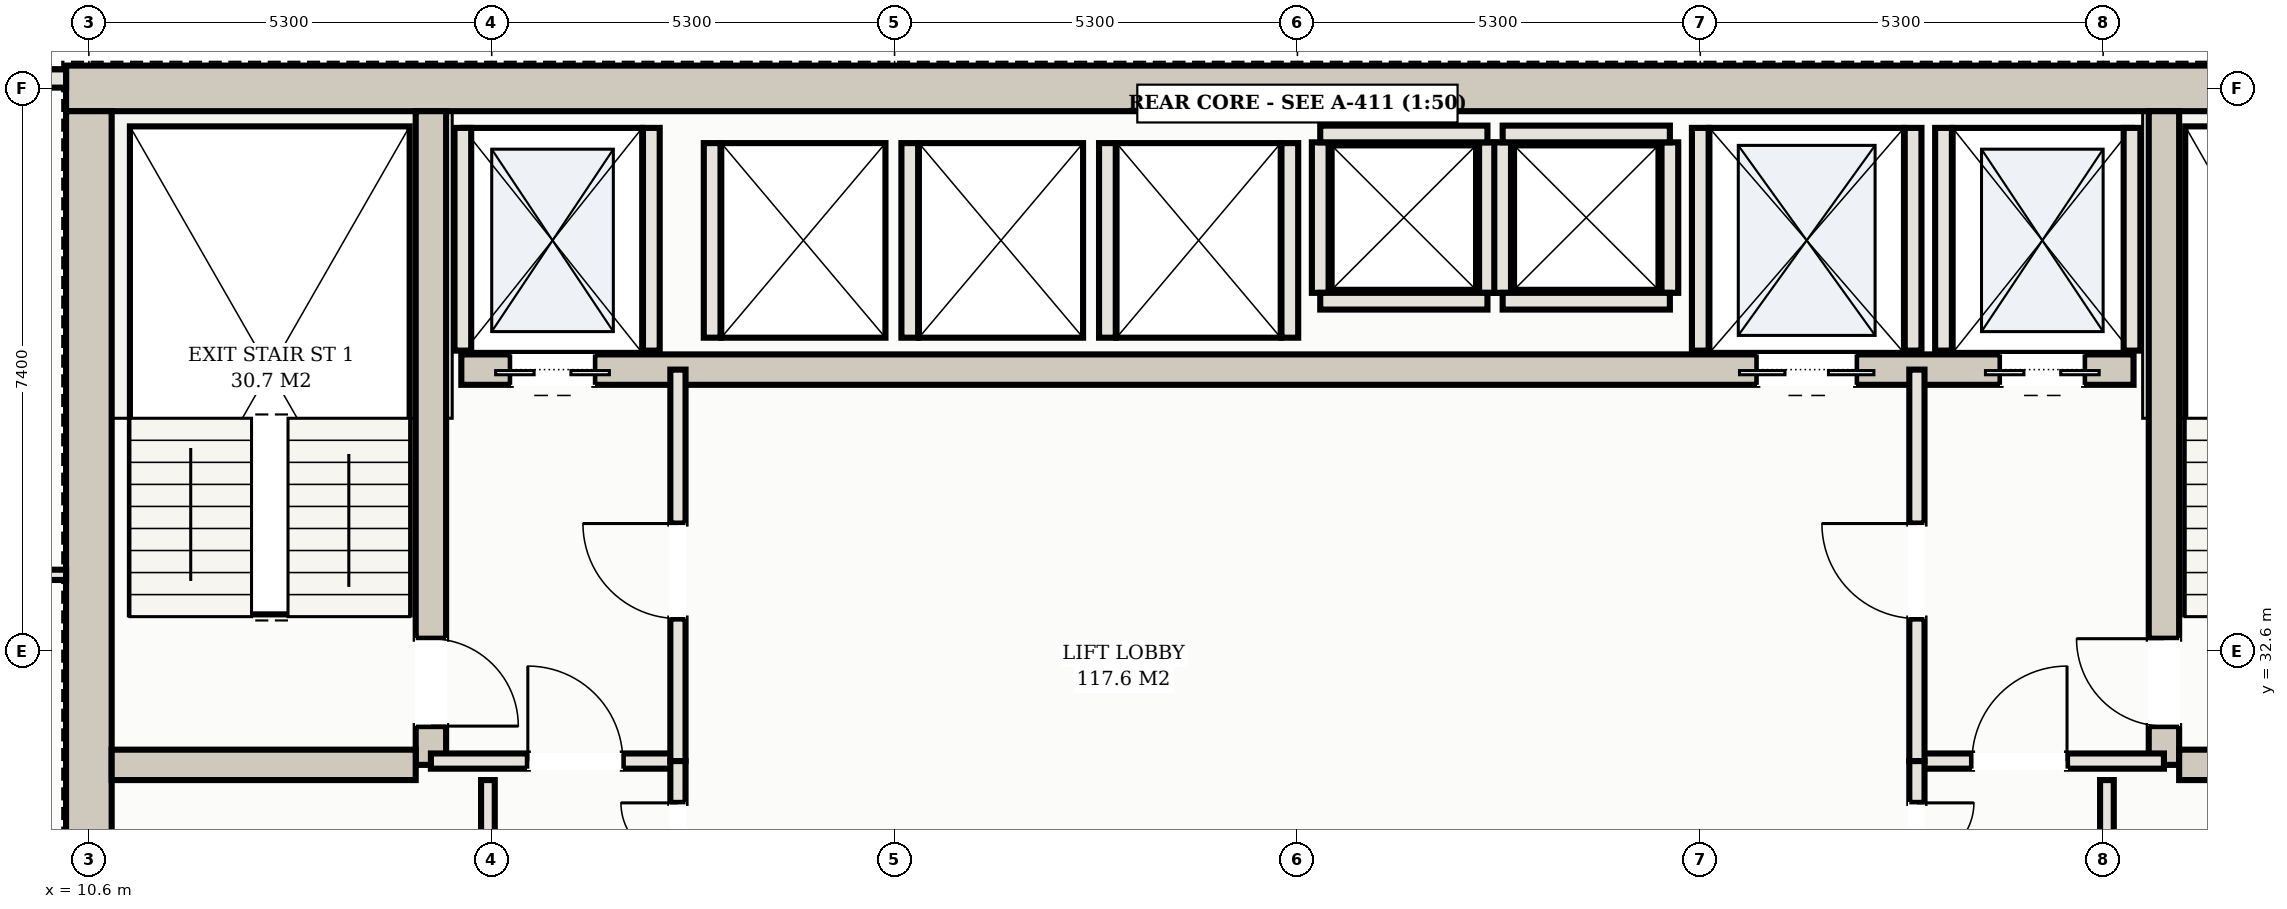
"""IFC4 building model, lengths in metres.
Left out: names, types, materials, properties, quantities, classifications, styles, units other than length and angle.
Written with IfcOpenShell. Run it as: python <this file> out.ifc"""

import sys

from ifc_helpers import new_model, si_unit, direction, frame, frame_2d, origin, place, context, subcontext, project, spatial, rectangle, extrude, element, fill, save


model = new_model("IFC4")
c1 = context("Model", 3, precision=1e-05, world=origin(), true_north=direction((0.0, 1.0)))
c2 = subcontext(c1, "Body", "Model", "MODEL_VIEW")
j1 = project(units=[si_unit("LENGTHUNIT", "METRE"), si_unit("PLANEANGLEUNIT", "RADIAN")], contexts=[c1])
p1 = place(None, origin())
s1 = spatial("IfcSite", under=j1, at=p1, CompositionType="ELEMENT")
p2 = place(p1, origin())
s2 = spatial("IfcBuilding", under=s1, at=p2, CompositionType="ELEMENT")
p3 = place(p2, frame((0.0, 0.0, 168.9)))
s3 = spatial("IfcBuildingStorey", under=s2, at=p3, CompositionType="ELEMENT", Elevation=168.9)
p4 = place(p3, frame((10.3, 40.0, 0.0), z_axis=(0.0, 0.0, 1.0), x_axis=(1.0, 0.0, 0.0)))
e1 = element("IfcWall", 1, at=p4, inside=s3, PredefinedType="SHEAR", context=c2, shape_type="SweptSolid", body=[
    extrude(rectangle(XDim=32.4, YDim=0.6, at=frame_2d((16.2, 0.0))), origin(), (0.0, 0.0, 1.0), 3.1),
])
p5 = place(p3, frame((10.6, 25.5, 0.0), z_axis=(0.0, 0.0, 1.0), x_axis=(0.0, 1.0, 0.0)))
e2 = element("IfcWall", 2, at=p5, inside=s3, PredefinedType="SHEAR", context=c2, shape_type="SweptSolid", body=[
    extrude(rectangle(XDim=14.2, YDim=0.6, at=frame_2d((7.1, 0.0))), origin(), (0.0, 0.0, 1.0), 3.1),
])
p6 = place(p3, frame((15.1, 31.1, 0.0), z_axis=(0.0, 0.0, 1.0), x_axis=(0.0, 1.0, 0.0)))
e3 = element("IfcWall", 3, at=p6, inside=s3, PredefinedType="SHEAR", context=c2, shape_type="SweptSolid", body=[
    extrude(rectangle(XDim=8.6, YDim=0.4, at=frame_2d((4.3, 0.0))), origin(), (0.0, 0.0, 1.0), 3.1),
])
p7 = place(p6, frame((0.51, 0.0, 0.0)))
e4 = element("IfcOpeningElement", 4, at=p7, cuts=e3, PredefinedType="OPENING", context=c2, shape_type="SweptSolid", body=[
    extrude(rectangle(XDim=1.15, YDim=2.2, at=frame_2d((0.575, 1.1))), frame((0.0, 0.21, 0.0), z_axis=(0.0, -1.0, 0.0), x_axis=(1.0, 0.0, 0.0)), (0.0, 0.0, 1.0), 0.42),
])
p8 = place(p3, frame((10.9, 31.1, 0.0), z_axis=(0.0, 0.0, 1.0), x_axis=(1.0, 0.0, 0.0)))
e5 = element("IfcWall", 5, at=p8, inside=s3, PredefinedType="SHEAR", context=c2, shape_type="SweptSolid", body=[
    extrude(rectangle(XDim=4.0, YDim=0.4, at=frame_2d((2.0, 0.0))), origin(), (0.0, 0.0, 1.0), 3.1),
])
p9 = place(p3, frame((37.9, 31.1, 0.0), z_axis=(0.0, 0.0, 1.0), x_axis=(0.0, 1.0, 0.0)))
e6 = element("IfcWall", 6, at=p9, inside=s3, PredefinedType="SHEAR", context=c2, shape_type="SweptSolid", body=[
    extrude(rectangle(XDim=8.6, YDim=0.4, at=frame_2d((4.3, 0.0))), origin(), (0.0, 0.0, 1.0), 3.1),
])
p10 = place(p9, frame((0.51, 0.0, 0.0)))
e7 = element("IfcOpeningElement", 7, at=p10, cuts=e6, PredefinedType="OPENING", context=c2, shape_type="SweptSolid", body=[
    extrude(rectangle(XDim=1.15, YDim=2.2, at=frame_2d((0.575, 1.1))), frame((0.0, 0.21, 0.0), z_axis=(0.0, -1.0, 0.0), x_axis=(1.0, 0.0, 0.0)), (0.0, 0.0, 1.0), 0.42),
])
p11 = place(p3, frame((38.1, 31.1, 0.0), z_axis=(0.0, 0.0, 1.0), x_axis=(1.0, 0.0, 0.0)))
e8 = element("IfcWall", 8, at=p11, inside=s3, PredefinedType="SHEAR", context=c2, shape_type="SweptSolid", body=[
    extrude(rectangle(XDim=4.0, YDim=0.4, at=frame_2d((2.0, 0.0))), origin(), (0.0, 0.0, 1.0), 3.1),
])
p12 = place(p3, frame((15.5, 36.3, 0.0), z_axis=(0.0, 0.0, 1.0), x_axis=(1.0, 0.0, 0.0)))
e9 = element("IfcWall", 9, at=p12, inside=s3, PredefinedType="SHEAR", context=c2, shape_type="SweptSolid", body=[
    extrude(rectangle(XDim=22.0, YDim=0.4, at=frame_2d((11.0, 0.0))), origin(), (0.0, 0.0, 1.0), 3.1),
])
p13 = place(p12, frame((0.65, 0.0, 0.0)))
e10 = element("IfcOpeningElement", 10, at=p13, cuts=e9, PredefinedType="OPENING", context=c2, shape_type="SweptSolid", body=[
    extrude(rectangle(XDim=1.1, YDim=2.15, at=frame_2d((0.55, 1.075))), frame((0.0, 0.21, 0.0), z_axis=(0.0, -1.0, 0.0), x_axis=(1.0, 0.0, 0.0)), (0.0, 0.0, 1.0), 0.42),
])
p14 = place(p12, frame((20.25, 0.0, 0.0)))
e11 = element("IfcOpeningElement", 11, at=p14, cuts=e9, PredefinedType="OPENING", context=c2, shape_type="SweptSolid", body=[
    extrude(rectangle(XDim=1.1, YDim=2.15, at=frame_2d((0.55, 1.075))), frame((0.0, 0.21, 0.0), z_axis=(0.0, -1.0, 0.0), x_axis=(1.0, 0.0, 0.0)), (0.0, 0.0, 1.0), 0.42),
])
p15 = place(p12, frame((17.05, 0.0, 0.0)))
e12 = element("IfcOpeningElement", 12, at=p15, cuts=e9, PredefinedType="OPENING", context=c2, shape_type="SweptSolid", body=[
    extrude(rectangle(XDim=1.3, YDim=2.2, at=frame_2d((0.65, 1.1))), frame((0.0, 0.21, 0.0), z_axis=(0.0, -1.0, 0.0), x_axis=(1.0, 0.0, 0.0)), (0.0, 0.0, 1.0), 0.42),
])
for number, where, z_axis, x_axis in (
    (13, (15.52, 36.55, 0.0), (0.0, 0.0, 1.0), (0.0, 1.0, 0.0)),
    (14, (18.0, 36.55, 0.0), (0.0, 0.0, 1.0), (0.0, 1.0, 0.0)),
    (15, (35.0, 36.55, 0.0), (0.0, 0.0, 1.0), (0.0, 1.0, 0.0)),
    (16, (37.48, 36.55, 0.0), (0.0, 0.0, 1.0), (0.0, 1.0, 0.0)),
    (17, (31.8, 36.55, 0.0), (0.0, 0.0, 1.0), (0.0, 1.0, 0.0)),
    (18, (34.6, 36.55, 0.0), (0.0, 0.0, 1.0), (0.0, 1.0, 0.0)),
):
    element("IfcWall", number, at=place(p3, frame(where, z_axis=z_axis, x_axis=x_axis)), inside=s3, PredefinedType="SOLIDWALL", context=c2, shape_type="SweptSolid", body=[
        extrude(rectangle(XDim=2.93, YDim=0.22, at=frame_2d((1.465, 0.0))), origin(), (0.0, 0.0, 1.0), 3.1),
    ])
for number, where, z_axis, x_axis in (
    (19, (18.8, 36.72, 0.0), (0.0, 0.0, 1.0), (0.0, 1.0, 0.0)),
    (20, (21.4, 36.72, 0.0), (0.0, 0.0, 1.0), (0.0, 1.0, 0.0)),
    (21, (24.0, 36.72, 0.0), (0.0, 0.0, 1.0), (0.0, 1.0, 0.0)),
    (22, (26.4, 36.72, 0.0), (0.0, 0.0, 1.0), (0.0, 1.0, 0.0)),
):
    element("IfcWall", number, at=place(p3, frame(where, z_axis=z_axis, x_axis=x_axis)), inside=s3, PredefinedType="SOLIDWALL", context=c2, shape_type="SweptSolid", body=[
        extrude(rectangle(XDim=2.56, YDim=0.22, at=frame_2d((1.28, 0.0))), origin(), (0.0, 0.0, 1.0), 3.1),
    ])
for number, where, z_axis, x_axis in (
    (23, (26.8, 37.31, 0.0), (0.0, 0.0, 1.0), (0.0, 1.0, 0.0)),
    (24, (29.0, 37.31, 0.0), (0.0, 0.0, 1.0), (0.0, 1.0, 0.0)),
):
    element("IfcWall", number, at=place(p3, frame(where, z_axis=z_axis, x_axis=x_axis)), inside=s3, PredefinedType="SOLIDWALL", context=c2, shape_type="SweptSolid", body=[
        extrude(rectangle(XDim=1.98, YDim=0.22, at=frame_2d((0.99, 0.0))), origin(), (0.0, 0.0, 1.0), 3.1),
    ])
for number, where, z_axis, x_axis in (
    (25, (26.8, 39.4, 0.0), (0.0, 0.0, 1.0), (1.0, 0.0, 0.0)),
    (26, (26.8, 37.2, 0.0), (0.0, 0.0, 1.0), (1.0, 0.0, 0.0)),
):
    element("IfcWall", number, at=place(p3, frame(where, z_axis=z_axis, x_axis=x_axis)), inside=s3, PredefinedType="SOLIDWALL", context=c2, shape_type="SweptSolid", body=[
        extrude(rectangle(XDim=2.2, YDim=0.22, at=frame_2d((1.1, 0.0))), origin(), (0.0, 0.0, 1.0), 3.1),
    ])
for number, where, z_axis, x_axis in (
    (27, (29.2, 37.31, 0.0), (0.0, 0.0, 1.0), (0.0, 1.0, 0.0)),
    (28, (31.4, 37.31, 0.0), (0.0, 0.0, 1.0), (0.0, 1.0, 0.0)),
):
    element("IfcWall", number, at=place(p3, frame(where, z_axis=z_axis, x_axis=x_axis)), inside=s3, PredefinedType="SOLIDWALL", context=c2, shape_type="SweptSolid", body=[
        extrude(rectangle(XDim=1.98, YDim=0.22, at=frame_2d((0.99, 0.0))), origin(), (0.0, 0.0, 1.0), 3.1),
    ])
for number, where, z_axis, x_axis in (
    (29, (29.2, 39.4, 0.0), (0.0, 0.0, 1.0), (1.0, 0.0, 0.0)),
    (30, (29.2, 37.2, 0.0), (0.0, 0.0, 1.0), (1.0, 0.0, 0.0)),
):
    element("IfcWall", number, at=place(p3, frame(where, z_axis=z_axis, x_axis=x_axis)), inside=s3, PredefinedType="SOLIDWALL", context=c2, shape_type="SweptSolid", body=[
        extrude(rectangle(XDim=2.2, YDim=0.22, at=frame_2d((1.1, 0.0))), origin(), (0.0, 0.0, 1.0), 3.1),
    ])
p16 = place(p3, frame((10.3, 40.13, 0.0), z_axis=(0.0, 0.0, 1.0), x_axis=(-1.0, 0.0, 0.0)))
e31 = element("IfcWall", 31, at=p16, inside=s3, PredefinedType="SOLIDWALL", context=c2, shape_type="SweptSolid", body=[
    extrude(rectangle(XDim=1.65, YDim=0.24, at=frame_2d((0.825, 0.0))), origin(), (0.0, 0.0, 1.0), 3.1),
])
p17 = place(p3, frame((15.1, 31.15, 0.0), z_axis=(0.0, 0.0, 1.0), x_axis=(1.0, 0.0, 0.0)))
e32 = element("IfcWall", 32, at=p17, inside=s3, PredefinedType="PARTITIONING", context=c2, shape_type="SweptSolid", body=[
    extrude(rectangle(XDim=3.25, YDim=0.2, at=frame_2d((1.625, 0.0))), origin(), (0.0, 0.0, 1.0), 2.38),
])
p18 = place(p17, frame((1.275, 0.0, 0.0)))
e33 = element("IfcOpeningElement", 33, at=p18, cuts=e32, PredefinedType="OPENING", context=c2, shape_type="SweptSolid", body=[
    extrude(rectangle(XDim=1.25, YDim=2.2, at=frame_2d((0.625, 1.1))), frame((0.0, 0.11, 0.0), z_axis=(0.0, -1.0, 0.0), x_axis=(1.0, 0.0, 0.0)), (0.0, 0.0, 1.0), 0.22),
])
p19 = place(p3, frame((18.35, 31.15, 0.0), z_axis=(0.0, 0.0, 1.0), x_axis=(0.0, 1.0, 0.0)))
e34 = element("IfcWall", 34, at=p19, inside=s3, PredefinedType="PARTITIONING", context=c2, shape_type="SweptSolid", body=[
    extrude(rectangle(XDim=5.15, YDim=0.2, at=frame_2d((2.575, 0.0))), origin(), (0.0, 0.0, 1.0), 2.38),
])
p20 = place(p19, frame((1.875, 0.0, 0.0)))
e35 = element("IfcOpeningElement", 35, at=p20, cuts=e34, PredefinedType="OPENING", context=c2, shape_type="SweptSolid", body=[
    extrude(rectangle(XDim=1.25, YDim=2.2, at=frame_2d((0.625, 1.1))), frame((0.0, 0.11, 0.0), z_axis=(0.0, -1.0, 0.0), x_axis=(1.0, 0.0, 0.0)), (0.0, 0.0, 1.0), 0.22),
])
p21 = place(p3, frame((34.65, 31.15, 0.0), z_axis=(0.0, 0.0, 1.0), x_axis=(1.0, 0.0, 0.0)))
e36 = element("IfcWall", 36, at=p21, inside=s3, PredefinedType="PARTITIONING", context=c2, shape_type="SweptSolid", body=[
    extrude(rectangle(XDim=3.25, YDim=0.2, at=frame_2d((1.625, 0.0))), origin(), (0.0, 0.0, 1.0), 2.38),
])
p22 = place(p21, frame((0.725, 0.0, 0.0)))
e37 = element("IfcOpeningElement", 37, at=p22, cuts=e36, PredefinedType="OPENING", context=c2, shape_type="SweptSolid", body=[
    extrude(rectangle(XDim=1.25, YDim=2.2, at=frame_2d((0.625, 1.1))), frame((0.0, 0.11, 0.0), z_axis=(0.0, -1.0, 0.0), x_axis=(1.0, 0.0, 0.0)), (0.0, 0.0, 1.0), 0.22),
])
p23 = place(p3, frame((34.65, 31.15, 0.0), z_axis=(0.0, 0.0, 1.0), x_axis=(0.0, 1.0, 0.0)))
e38 = element("IfcWall", 38, at=p23, inside=s3, PredefinedType="PARTITIONING", context=c2, shape_type="SweptSolid", body=[
    extrude(rectangle(XDim=5.15, YDim=0.2, at=frame_2d((2.575, 0.0))), origin(), (0.0, 0.0, 1.0), 2.38),
])
p24 = place(p23, frame((1.875, 0.0, 0.0)))
e39 = element("IfcOpeningElement", 39, at=p24, cuts=e38, PredefinedType="OPENING", context=c2, shape_type="SweptSolid", body=[
    extrude(rectangle(XDim=1.25, YDim=2.2, at=frame_2d((0.625, 1.1))), frame((0.0, 0.11, 0.0), z_axis=(0.0, -1.0, 0.0), x_axis=(1.0, 0.0, 0.0)), (0.0, 0.0, 1.0), 0.22),
])
p25 = place(p3, frame((15.85, 25.5, 0.0), z_axis=(0.0, 0.0, 1.0), x_axis=(0.0, 1.0, 0.0)))
e40 = element("IfcWall", 40, at=p25, inside=s3, PredefinedType="PARTITIONING", context=c2, shape_type="SweptSolid", body=[
    extrude(rectangle(XDim=5.4, YDim=0.18, at=frame_2d((2.7, 0.0))), origin(), (0.0, 0.0, 1.0), 2.38),
])
p26 = place(p25, frame((2.24, 0.0, 0.0)))
e41 = element("IfcOpeningElement", 41, at=p26, cuts=e40, PredefinedType="OPENING", context=c2, shape_type="SweptSolid", body=[
    extrude(rectangle(XDim=0.92, YDim=2.15, at=frame_2d((0.46, 1.075))), frame((0.0, 0.1, 0.0), z_axis=(0.0, -1.0, 0.0), x_axis=(1.0, 0.0, 0.0)), (0.0, 0.0, 1.0), 0.2),
])
p27 = place(p3, frame((37.15, 25.5, 0.0), z_axis=(0.0, 0.0, 1.0), x_axis=(0.0, 1.0, 0.0)))
e42 = element("IfcWall", 42, at=p27, inside=s3, PredefinedType="PARTITIONING", context=c2, shape_type="SweptSolid", body=[
    extrude(rectangle(XDim=5.4, YDim=0.18, at=frame_2d((2.7, 0.0))), origin(), (0.0, 0.0, 1.0), 2.38),
])
p28 = place(p27, frame((2.24, 0.0, 0.0)))
e43 = element("IfcOpeningElement", 43, at=p28, cuts=e42, PredefinedType="OPENING", context=c2, shape_type="SweptSolid", body=[
    extrude(rectangle(XDim=0.92, YDim=2.15, at=frame_2d((0.46, 1.075))), frame((0.0, 0.1, 0.0), z_axis=(0.0, -1.0, 0.0), x_axis=(1.0, 0.0, 0.0)), (0.0, 0.0, 1.0), 0.2),
])
p29 = place(p3, frame((18.35, 28.55, 0.0), z_axis=(0.0, 0.0, 1.0), x_axis=(0.0, 1.0, 0.0)))
e44 = element("IfcWall", 44, at=p29, inside=s3, PredefinedType="PARTITIONING", context=c2, shape_type="SweptSolid", body=[
    extrude(rectangle(XDim=2.6, YDim=0.2, at=frame_2d((1.3, 0.0))), origin(), (0.0, 0.0, 1.0), 2.38),
])
p30 = place(p29, frame((0.55, 0.0, 0.0)))
e45 = element("IfcOpeningElement", 45, at=p30, cuts=e44, PredefinedType="OPENING", context=c2, shape_type="SweptSolid", body=[
    extrude(rectangle(XDim=1.5, YDim=2.25, at=frame_2d((0.75, 1.125))), frame((0.0, 0.11, 0.0), z_axis=(0.0, -1.0, 0.0), x_axis=(1.0, 0.0, 0.0)), (0.0, 0.0, 1.0), 0.22),
])
p31 = place(p3, frame((34.65, 28.55, 0.0), z_axis=(0.0, 0.0, 1.0), x_axis=(0.0, 1.0, 0.0)))
e46 = element("IfcWall", 46, at=p31, inside=s3, PredefinedType="PARTITIONING", context=c2, shape_type="SweptSolid", body=[
    extrude(rectangle(XDim=2.6, YDim=0.2, at=frame_2d((1.3, 0.0))), origin(), (0.0, 0.0, 1.0), 2.38),
])
p32 = place(p31, frame((0.55, 0.0, 0.0)))
e47 = element("IfcOpeningElement", 47, at=p32, cuts=e46, PredefinedType="OPENING", context=c2, shape_type="SweptSolid", body=[
    extrude(rectangle(XDim=1.5, YDim=2.25, at=frame_2d((0.75, 1.125))), frame((0.0, 0.11, 0.0), z_axis=(0.0, -1.0, 0.0), x_axis=(1.0, 0.0, 0.0)), (0.0, 0.0, 1.0), 0.22),
])
p33 = place(p3, frame((4.32, 33.6, 0.0), z_axis=(0.0, 0.0, 1.0), x_axis=(1.0, 0.0, 0.0)))
e48 = element("IfcWall", 48, at=p33, inside=s3, PredefinedType="PARTITIONING", context=c2, shape_type="SweptSolid", body=[
    extrude(rectangle(XDim=5.98, YDim=0.135, at=frame_2d((2.99, 0.0))), origin(), (0.0, 0.0, 1.0), 2.38),
])
p34 = place(p33, frame((2.53, 0.0, 0.0)))
e49 = element("IfcOpeningElement", 49, at=p34, cuts=e48, PredefinedType="OPENING", context=c2, shape_type="SweptSolid", body=[
    extrude(rectangle(XDim=0.92, YDim=2.15, at=frame_2d((0.46, 1.075))), frame((0.0, 0.078, 0.0), z_axis=(0.0, -1.0, 0.0), x_axis=(1.0, 0.0, 0.0)), (0.0, 0.0, 1.0), 0.155),
])
p35 = place(p13, frame((1.1, 0.0, 0.0), z_axis=(0.0, 0.0, 1.0), x_axis=(-1.0, 0.0, 0.0)))
e50 = element("IfcDoor", 50, at=p35, inside=s3, OperationType="DOUBLE_DOOR_SLIDING", PredefinedType="DOOR", context=c2, shape_type="SweptSolid", body=[
    extrude(rectangle(XDim=1.1, YDim=2.15, at=frame_2d((0.55, 1.075))), frame((0.0, 0.025, 0.0), z_axis=(0.0, -1.0, 0.0), x_axis=(1.0, 0.0, 0.0)), (0.0, 0.0, 1.0), 0.05),
])
fill(e10, e50)
p36 = place(p14, frame((1.1, 0.0, 0.0), z_axis=(0.0, 0.0, 1.0), x_axis=(-1.0, 0.0, 0.0)))
e51 = element("IfcDoor", 51, at=p36, inside=s3, OperationType="DOUBLE_DOOR_SLIDING", PredefinedType="DOOR", context=c2, shape_type="SweptSolid", body=[
    extrude(rectangle(XDim=1.1, YDim=2.15, at=frame_2d((0.55, 1.075))), frame((0.0, 0.025, 0.0), z_axis=(0.0, -1.0, 0.0), x_axis=(1.0, 0.0, 0.0)), (0.0, 0.0, 1.0), 0.05),
])
fill(e11, e51)
p37 = place(p15, frame((1.3, 0.0, 0.0), z_axis=(0.0, 0.0, 1.0), x_axis=(-1.0, 0.0, 0.0)))
e52 = element("IfcDoor", 52, at=p37, inside=s3, OperationType="DOUBLE_DOOR_SLIDING", PredefinedType="DOOR", context=c2, shape_type="SweptSolid", body=[
    extrude(rectangle(XDim=1.3, YDim=2.2, at=frame_2d((0.65, 1.1))), frame((0.0, 0.025, 0.0), z_axis=(0.0, -1.0, 0.0), x_axis=(1.0, 0.0, 0.0)), (0.0, 0.0, 1.0), 0.05),
])
fill(e12, e52)
p38 = place(p18, origin())
e53 = element("IfcDoor", 53, at=p38, inside=s3, OperationType="SINGLE_SWING_LEFT", PredefinedType="DOOR", context=c2, shape_type="SweptSolid", body=[
    extrude(rectangle(XDim=1.25, YDim=2.2, at=frame_2d((0.625, 1.1))), frame((0.0, 0.025, 0.0), z_axis=(0.0, -1.0, 0.0), x_axis=(1.0, 0.0, 0.0)), (0.0, 0.0, 1.0), 0.05),
])
fill(e33, e53)
p39 = place(p20, origin())
e54 = element("IfcDoor", 54, at=p39, inside=s3, OperationType="SINGLE_SWING_RIGHT", PredefinedType="DOOR", context=c2, shape_type="SweptSolid", body=[
    extrude(rectangle(XDim=1.25, YDim=2.2, at=frame_2d((0.625, 1.1))), frame((0.0, 0.025, 0.0), z_axis=(0.0, -1.0, 0.0), x_axis=(1.0, 0.0, 0.0)), (0.0, 0.0, 1.0), 0.05),
])
fill(e35, e54)
p40 = place(p22, origin())
e55 = element("IfcDoor", 55, at=p40, inside=s3, OperationType="SINGLE_SWING_RIGHT", PredefinedType="DOOR", context=c2, shape_type="SweptSolid", body=[
    extrude(rectangle(XDim=1.25, YDim=2.2, at=frame_2d((0.625, 1.1))), frame((0.0, 0.025, 0.0), z_axis=(0.0, -1.0, 0.0), x_axis=(1.0, 0.0, 0.0)), (0.0, 0.0, 1.0), 0.05),
])
fill(e37, e55)
p41 = place(p24, origin())
e56 = element("IfcDoor", 56, at=p41, inside=s3, OperationType="SINGLE_SWING_RIGHT", PredefinedType="DOOR", context=c2, shape_type="SweptSolid", body=[
    extrude(rectangle(XDim=1.25, YDim=2.2, at=frame_2d((0.625, 1.1))), frame((0.0, 0.025, 0.0), z_axis=(0.0, -1.0, 0.0), x_axis=(1.0, 0.0, 0.0)), (0.0, 0.0, 1.0), 0.05),
])
fill(e39, e56)
p42 = place(p7, frame((1.15, 0.0, 0.0), z_axis=(0.0, 0.0, 1.0), x_axis=(-1.0, 0.0, 0.0)))
e57 = element("IfcDoor", 57, at=p42, inside=s3, OperationType="SINGLE_SWING_RIGHT", PredefinedType="DOOR", context=c2, shape_type="SweptSolid", body=[
    extrude(rectangle(XDim=1.15, YDim=2.2, at=frame_2d((0.575, 1.1))), frame((0.0, 0.025, 0.0), z_axis=(0.0, -1.0, 0.0), x_axis=(1.0, 0.0, 0.0)), (0.0, 0.0, 1.0), 0.05),
])
fill(e4, e57)
p43 = place(p10, origin())
e58 = element("IfcDoor", 58, at=p43, inside=s3, OperationType="SINGLE_SWING_RIGHT", PredefinedType="DOOR", context=c2, shape_type="SweptSolid", body=[
    extrude(rectangle(XDim=1.15, YDim=2.2, at=frame_2d((0.575, 1.1))), frame((0.0, 0.025, 0.0), z_axis=(0.0, -1.0, 0.0), x_axis=(1.0, 0.0, 0.0)), (0.0, 0.0, 1.0), 0.05),
])
fill(e7, e58)
p44 = place(p30, origin())
e59 = element("IfcDoor", 59, at=p44, inside=s3, OperationType="DOUBLE_DOOR_SINGLE_SWING", PredefinedType="DOOR", context=c2, shape_type="SweptSolid", body=[
    extrude(rectangle(XDim=1.5, YDim=2.25, at=frame_2d((0.75, 1.125))), frame((0.0, 0.025, 0.0), z_axis=(0.0, -1.0, 0.0), x_axis=(1.0, 0.0, 0.0)), (0.0, 0.0, 1.0), 0.05),
])
fill(e45, e59)
p45 = place(p32, frame((1.5, 0.0, 0.0), z_axis=(0.0, 0.0, 1.0), x_axis=(-1.0, 0.0, 0.0)))
e60 = element("IfcDoor", 60, at=p45, inside=s3, OperationType="DOUBLE_DOOR_SINGLE_SWING", PredefinedType="DOOR", context=c2, shape_type="SweptSolid", body=[
    extrude(rectangle(XDim=1.5, YDim=2.25, at=frame_2d((0.75, 1.125))), frame((0.0, 0.025, 0.0), z_axis=(0.0, -1.0, 0.0), x_axis=(1.0, 0.0, 0.0)), (0.0, 0.0, 1.0), 0.05),
])
fill(e47, e60)
save(model, sys.argv[1])
